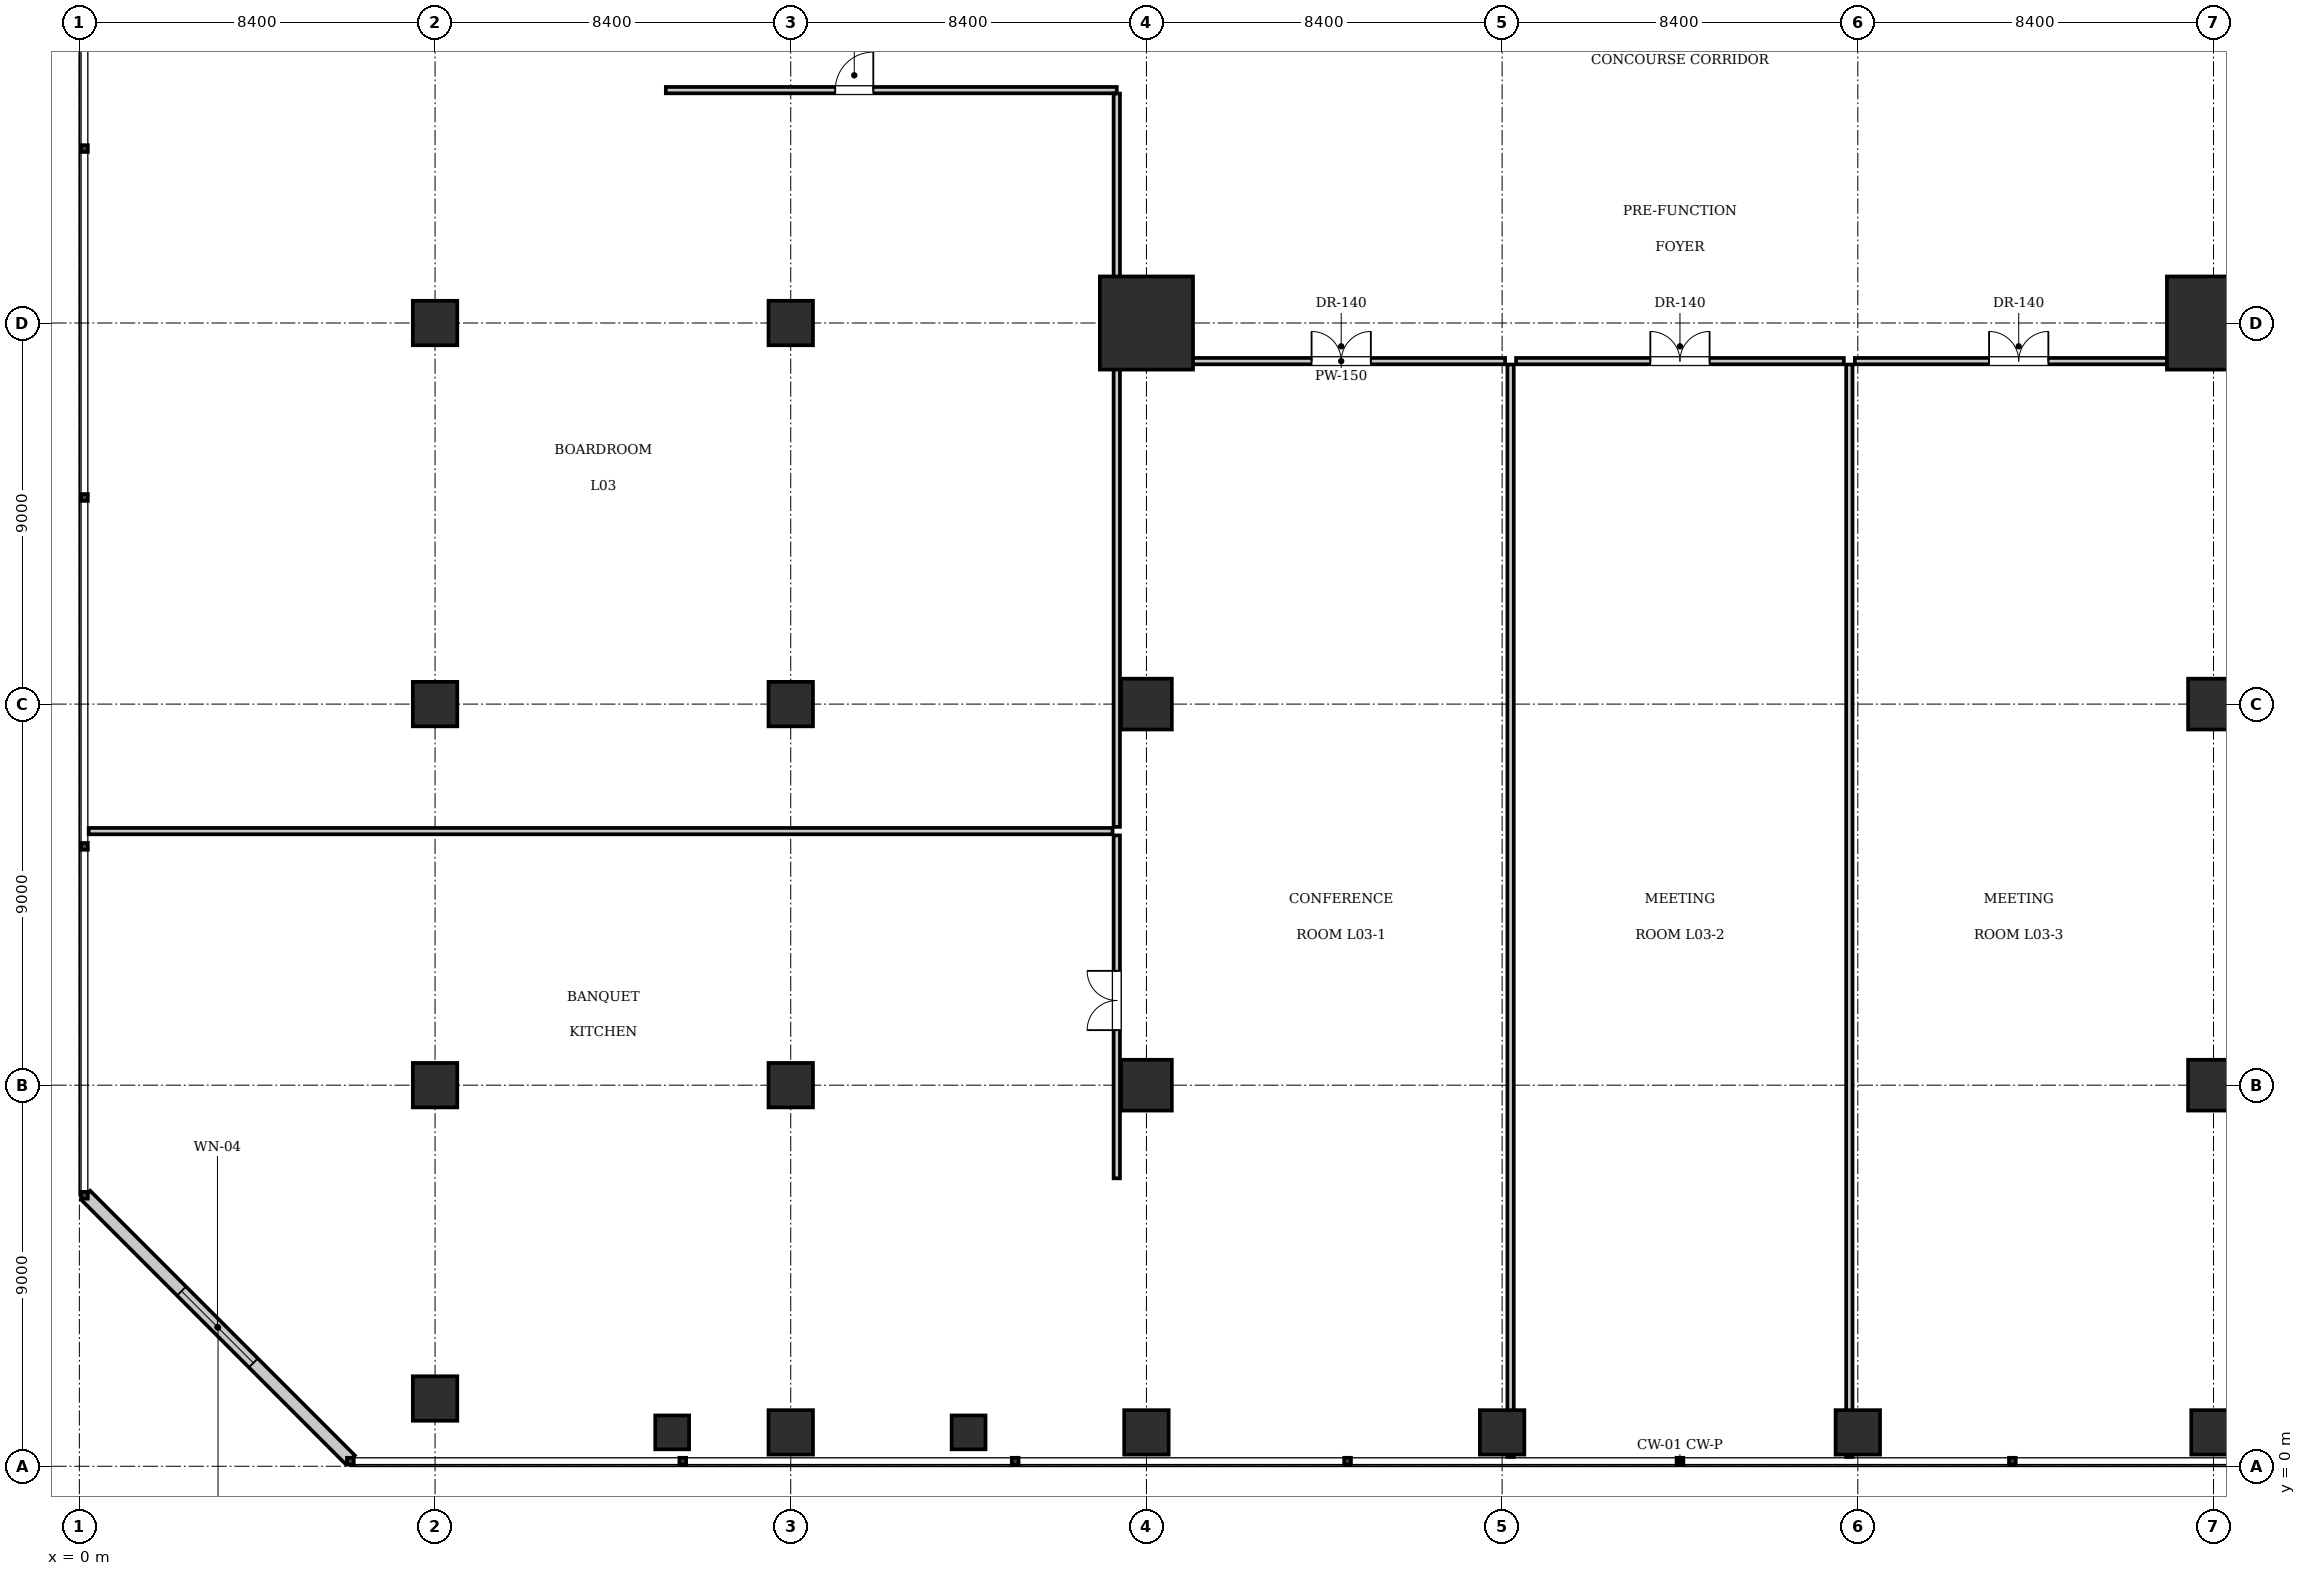
"""IFC4 building model, lengths in metres.
Left out: names, types, materials, properties, quantities, classifications, styles, units other than length and angle.
Written with IfcOpenShell. Run it as: python <this file> out.ifc"""

import sys

from ifc_helpers import new_model, si_unit, direction, frame, frame_2d, origin, origin_2d, place, context, subcontext, project, spatial, rectangle, extrude, element, fill, save


model = new_model("IFC4")
c1 = context("Model", 3, precision=1e-05, world=origin(), true_north=direction((0.0, 1.0)))
c2 = subcontext(c1, "Body", "Model", "MODEL_VIEW")
j1 = project(units=[si_unit("LENGTHUNIT", "METRE"), si_unit("PLANEANGLEUNIT", "RADIAN")], contexts=[c1])
p1 = place(None, origin())
s1 = spatial("IfcSite", under=j1, at=p1, CompositionType="ELEMENT")
p2 = place(p1, origin())
s2 = spatial("IfcBuilding", under=s1, at=p2, CompositionType="ELEMENT")
p3 = place(p2, frame((0.0, 0.0, 16.45)))
s3 = spatial("IfcBuildingStorey", under=s2, at=p3, CompositionType="ELEMENT", Elevation=16.45)
for number, where, z_axis, x_axis in (
    (1, (25.2, 27.0, 0.0), (0.0, 0.0, 1.0), (1.0, 0.0, 0.0)),
    (2, (50.4, 27.0, 0.0), (0.0, 0.0, 1.0), (1.0, 0.0, 0.0)),
):
    element("IfcColumn", number, at=place(p3, frame(where, z_axis=z_axis, x_axis=x_axis)), inside=s3, PredefinedType="COLUMN", context=c2, shape_type="SweptSolid", body=[
        extrude(rectangle(XDim=2.2, YDim=2.2, at=origin_2d()), origin(), (0.0, 0.0, 1.0), 4.9),
    ])
for number, where, z_axis, x_axis in (
    (3, (25.2, 18.0, 0.0), (0.0, 0.0, 1.0), (1.0, 0.0, 0.0)),
    (4, (50.4, 18.0, 0.0), (0.0, 0.0, 1.0), (1.0, 0.0, 0.0)),
    (5, (25.2, 9.0, 0.0), (0.0, 0.0, 1.0), (1.0, 0.0, 0.0)),
    (6, (50.4, 9.0, 0.0), (0.0, 0.0, 1.0), (1.0, 0.0, 0.0)),
):
    element("IfcColumn", number, at=place(p3, frame(where, z_axis=z_axis, x_axis=x_axis)), inside=s3, PredefinedType="COLUMN", context=c2, shape_type="SweptSolid", body=[
        extrude(rectangle(XDim=1.2, YDim=1.2, at=origin_2d()), origin(), (0.0, 0.0, 1.0), 4.9),
    ])
for number, where, z_axis, x_axis in (
    (7, (16.8, 9.0, 0.0), (0.0, 0.0, 1.0), (1.0, 0.0, 0.0)),
    (8, (16.8, 18.0, 0.0), (0.0, 0.0, 1.0), (1.0, 0.0, 0.0)),
    (9, (16.8, 27.0, 0.0), (0.0, 0.0, 1.0), (1.0, 0.0, 0.0)),
    (10, (8.4, 1.6, 0.0), (0.0, 0.0, 1.0), (1.0, 0.0, 0.0)),
    (11, (8.4, 9.0, 0.0), (0.0, 0.0, 1.0), (1.0, 0.0, 0.0)),
    (12, (8.4, 18.0, 0.0), (0.0, 0.0, 1.0), (1.0, 0.0, 0.0)),
    (13, (8.4, 27.0, 0.0), (0.0, 0.0, 1.0), (1.0, 0.0, 0.0)),
    (14, (16.8, 0.8, 0.0), (0.0, 0.0, 1.0), (1.0, 0.0, 0.0)),
    (15, (25.2, 0.8, 0.0), (0.0, 0.0, 1.0), (1.0, 0.0, 0.0)),
    (16, (33.6, 0.8, 0.0), (0.0, 0.0, 1.0), (1.0, 0.0, 0.0)),
    (17, (42.0, 0.8, 0.0), (0.0, 0.0, 1.0), (1.0, 0.0, 0.0)),
    (18, (50.4, 0.8, 0.0), (0.0, 0.0, 1.0), (1.0, 0.0, 0.0)),
):
    element("IfcColumn", number, at=place(p3, frame(where, z_axis=z_axis, x_axis=x_axis)), inside=s3, PredefinedType="COLUMN", context=c2, shape_type="SweptSolid", body=[
        extrude(rectangle(XDim=1.05, YDim=1.05, at=origin_2d()), origin(), (0.0, 0.0, 1.0), 4.9),
    ])
for number, where, z_axis, x_axis in (
    (19, (14.0, 0.8, 0.0), (0.0, 0.0, 1.0), (1.0, 0.0, 0.0)),
    (20, (21.0, 0.8, 0.0), (0.0, 0.0, 1.0), (1.0, 0.0, 0.0)),
):
    element("IfcColumn", number, at=place(p3, frame(where, z_axis=z_axis, x_axis=x_axis)), inside=s3, PredefinedType="PILASTER", context=c2, shape_type="SweptSolid", body=[
        extrude(rectangle(XDim=0.8, YDim=0.8, at=origin_2d()), origin(), (0.0, 0.0, 1.0), 4.9),
    ])
p4 = place(p3, frame((0.15, 6.4, 0.0), z_axis=(0.0, 0.0, 1.0), x_axis=(0.707106781187, -0.707106781187, 0.0)))
e21 = element("IfcWall", 21, at=p4, inside=s3, PredefinedType="SOLIDWALL", context=c2, shape_type="SweptSolid", body=[
    extrude(rectangle(XDim=8.839, YDim=0.3, at=frame_2d((4.419, 0.0))), origin(), (0.0, 0.0, 1.0), 4.62),
])
p5 = place(p4, frame((3.2, 0.0, 0.9)))
e22 = element("IfcOpeningElement", 22, at=p5, cuts=e21, PredefinedType="OPENING", context=c2, shape_type="SweptSolid", body=[
    extrude(rectangle(XDim=2.4, YDim=2.6, at=frame_2d((1.2, 1.3))), frame((0.0, 0.16, 0.0), z_axis=(0.0, -1.0, 0.0), x_axis=(1.0, 0.0, 0.0)), (0.0, 0.0, 1.0), 0.32),
])
p6 = place(p3, frame((25.93, 26.1, 0.0), z_axis=(0.0, 0.0, 1.0), x_axis=(1.0, 0.0, 0.0)))
e23 = element("IfcWall", 23, at=p6, inside=s3, PredefinedType="PARTITIONING", context=c2, shape_type="SweptSolid", body=[
    extrude(rectangle(XDim=7.74, YDim=0.15, at=frame_2d((3.87, 0.0))), origin(), (0.0, 0.0, 1.0), 4.62),
])
p7 = place(p6, frame((3.17, 0.0, 0.0)))
e24 = element("IfcOpeningElement", 24, at=p7, cuts=e23, PredefinedType="OPENING", context=c2, shape_type="SweptSolid", body=[
    extrude(rectangle(XDim=1.4, YDim=2.2, at=frame_2d((0.7, 1.1))), frame((0.0, 0.085, 0.0), z_axis=(0.0, -1.0, 0.0), x_axis=(1.0, 0.0, 0.0)), (0.0, 0.0, 1.0), 0.17),
])
p8 = place(p3, frame((33.93, 26.1, 0.0), z_axis=(0.0, 0.0, 1.0), x_axis=(1.0, 0.0, 0.0)))
e25 = element("IfcWall", 25, at=p8, inside=s3, PredefinedType="PARTITIONING", context=c2, shape_type="SweptSolid", body=[
    extrude(rectangle(XDim=7.74, YDim=0.15, at=frame_2d((3.87, 0.0))), origin(), (0.0, 0.0, 1.0), 4.62),
])
p9 = place(p8, frame((3.17, 0.0, 0.0)))
e26 = element("IfcOpeningElement", 26, at=p9, cuts=e25, PredefinedType="OPENING", context=c2, shape_type="SweptSolid", body=[
    extrude(rectangle(XDim=1.4, YDim=2.2, at=frame_2d((0.7, 1.1))), frame((0.0, 0.085, 0.0), z_axis=(0.0, -1.0, 0.0), x_axis=(1.0, 0.0, 0.0)), (0.0, 0.0, 1.0), 0.17),
])
p10 = place(p3, frame((41.93, 26.1, 0.0), z_axis=(0.0, 0.0, 1.0), x_axis=(1.0, 0.0, 0.0)))
e27 = element("IfcWall", 27, at=p10, inside=s3, PredefinedType="PARTITIONING", context=c2, shape_type="SweptSolid", body=[
    extrude(rectangle(XDim=7.74, YDim=0.15, at=frame_2d((3.87, 0.0))), origin(), (0.0, 0.0, 1.0), 4.62),
])
p11 = place(p10, frame((3.17, 0.0, 0.0)))
e28 = element("IfcOpeningElement", 28, at=p11, cuts=e27, PredefinedType="OPENING", context=c2, shape_type="SweptSolid", body=[
    extrude(rectangle(XDim=1.4, YDim=2.2, at=frame_2d((0.7, 1.1))), frame((0.0, 0.085, 0.0), z_axis=(0.0, -1.0, 0.0), x_axis=(1.0, 0.0, 0.0)), (0.0, 0.0, 1.0), 0.17),
])
for number, where, z_axis, x_axis in (
    (29, (33.8, 0.22, 0.0), (0.0, 0.0, 1.0), (0.0, 1.0, 0.0)),
    (30, (41.8, 0.22, 0.0), (0.0, 0.0, 1.0), (0.0, 1.0, 0.0)),
):
    element("IfcWall", number, at=place(p3, frame(where, z_axis=z_axis, x_axis=x_axis)), inside=s3, PredefinedType="PARTITIONING", context=c2, shape_type="SweptSolid", body=[
        extrude(rectangle(XDim=25.8, YDim=0.15, at=frame_2d((12.9, 0.0))), origin(), (0.0, 0.0, 1.0), 4.62),
    ])
p12 = place(p3, frame((0.22, 15.0, 0.0), z_axis=(0.0, 0.0, 1.0), x_axis=(1.0, 0.0, 0.0)))
e31 = element("IfcWall", 31, at=p12, inside=s3, PredefinedType="PARTITIONING", context=c2, shape_type="SweptSolid", body=[
    extrude(rectangle(XDim=24.18, YDim=0.15, at=frame_2d((12.09, 0.0))), origin(), (0.0, 0.0, 1.0), 4.62),
])
p13 = place(p3, frame((13.85, 32.5, 0.0), z_axis=(0.0, 0.0, 1.0), x_axis=(1.0, 0.0, 0.0)))
e32 = element("IfcWall", 32, at=p13, inside=s3, PredefinedType="PARTITIONING", context=c2, shape_type="SweptSolid", body=[
    extrude(rectangle(XDim=10.65, YDim=0.15, at=frame_2d((5.325, 0.0))), origin(), (0.0, 0.0, 1.0), 4.62),
])
p14 = place(p13, frame((4.0, 0.0, 0.0)))
e33 = element("IfcOpeningElement", 33, at=p14, cuts=e32, PredefinedType="OPENING", context=c2, shape_type="SweptSolid", body=[
    extrude(rectangle(XDim=0.9, YDim=2.1, at=frame_2d((0.45, 1.05))), frame((0.0, 0.085, 0.0), z_axis=(0.0, -1.0, 0.0), x_axis=(1.0, 0.0, 0.0)), (0.0, 0.0, 1.0), 0.17),
])
p15 = place(p3, frame((24.5, 6.8, 0.0), z_axis=(0.0, 0.0, 1.0), x_axis=(0.0, 1.0, 0.0)))
e34 = element("IfcWall", 34, at=p15, inside=s3, PredefinedType="PARTITIONING", context=c2, shape_type="SweptSolid", body=[
    extrude(rectangle(XDim=8.1, YDim=0.15, at=frame_2d((4.05, 0.0))), origin(), (0.0, 0.0, 1.0), 4.62),
])
p16 = place(p15, frame((3.5, 0.0, 0.0)))
e35 = element("IfcOpeningElement", 35, at=p16, cuts=e34, PredefinedType="OPENING", context=c2, shape_type="SweptSolid", body=[
    extrude(rectangle(XDim=1.4, YDim=2.2, at=frame_2d((0.7, 1.1))), frame((0.0, 0.085, 0.0), z_axis=(0.0, -1.0, 0.0), x_axis=(1.0, 0.0, 0.0)), (0.0, 0.0, 1.0), 0.17),
])
p17 = place(p3, frame((24.5, 15.1, 0.0), z_axis=(0.0, 0.0, 1.0), x_axis=(0.0, 1.0, 0.0)))
e36 = element("IfcWall", 36, at=p17, inside=s3, PredefinedType="PARTITIONING", context=c2, shape_type="SweptSolid", body=[
    extrude(rectangle(XDim=17.32, YDim=0.15, at=frame_2d((8.66, 0.0))), origin(), (0.0, 0.0, 1.0), 4.62),
])
p18 = place(p5, origin())
e37 = element("IfcWindow", 37, at=p18, inside=s3, PartitioningType="SINGLE_PANEL", PredefinedType="WINDOW", context=c2, shape_type="SweptSolid", body=[
    extrude(rectangle(XDim=2.4, YDim=2.6, at=frame_2d((1.2, 1.3))), frame((0.0, 0.03, 0.0), z_axis=(0.0, -1.0, 0.0), x_axis=(1.0, 0.0, 0.0)), (0.0, 0.0, 1.0), 0.06),
])
fill(e22, e37)
p19 = place(p7, origin())
e38 = element("IfcDoor", 38, at=p19, inside=s3, OperationType="DOUBLE_DOOR_SINGLE_SWING", PredefinedType="DOOR", context=c2, shape_type="SweptSolid", body=[
    extrude(rectangle(XDim=1.4, YDim=2.2, at=frame_2d((0.7, 1.1))), frame((0.0, 0.025, 0.0), z_axis=(0.0, -1.0, 0.0), x_axis=(1.0, 0.0, 0.0)), (0.0, 0.0, 1.0), 0.05),
])
fill(e24, e38)
p20 = place(p9, origin())
e39 = element("IfcDoor", 39, at=p20, inside=s3, OperationType="DOUBLE_DOOR_SINGLE_SWING", PredefinedType="DOOR", context=c2, shape_type="SweptSolid", body=[
    extrude(rectangle(XDim=1.4, YDim=2.2, at=frame_2d((0.7, 1.1))), frame((0.0, 0.025, 0.0), z_axis=(0.0, -1.0, 0.0), x_axis=(1.0, 0.0, 0.0)), (0.0, 0.0, 1.0), 0.05),
])
fill(e26, e39)
p21 = place(p11, origin())
e40 = element("IfcDoor", 40, at=p21, inside=s3, OperationType="DOUBLE_DOOR_SINGLE_SWING", PredefinedType="DOOR", context=c2, shape_type="SweptSolid", body=[
    extrude(rectangle(XDim=1.4, YDim=2.2, at=frame_2d((0.7, 1.1))), frame((0.0, 0.025, 0.0), z_axis=(0.0, -1.0, 0.0), x_axis=(1.0, 0.0, 0.0)), (0.0, 0.0, 1.0), 0.05),
])
fill(e28, e40)
p22 = place(p14, origin())
e41 = element("IfcDoor", 41, at=p22, inside=s3, OperationType="SINGLE_SWING_RIGHT", PredefinedType="DOOR", context=c2, shape_type="SweptSolid", body=[
    extrude(rectangle(XDim=0.9, YDim=2.1, at=frame_2d((0.45, 1.05))), frame((0.0, 0.025, 0.0), z_axis=(0.0, -1.0, 0.0), x_axis=(1.0, 0.0, 0.0)), (0.0, 0.0, 1.0), 0.05),
])
fill(e33, e41)
p23 = place(p16, origin())
e42 = element("IfcDoor", 42, at=p23, inside=s3, OperationType="DOUBLE_DOOR_SINGLE_SWING", PredefinedType="DOOR", context=c2, shape_type="SweptSolid", body=[
    extrude(rectangle(XDim=1.4, YDim=2.2, at=frame_2d((0.7, 1.1))), frame((0.0, 0.025, 0.0), z_axis=(0.0, -1.0, 0.0), x_axis=(1.0, 0.0, 0.0)), (0.0, 0.0, 1.0), 0.05),
])
fill(e35, e42)
save(model, sys.argv[1])
